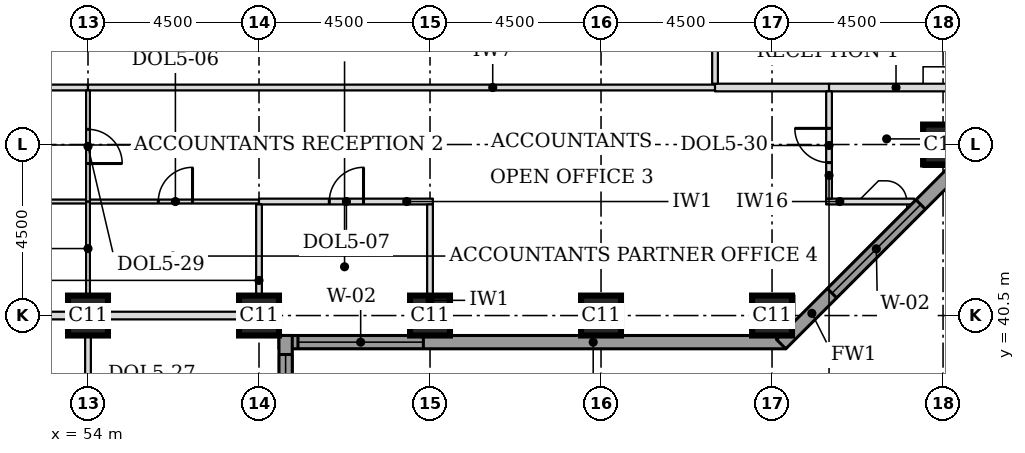
"""IFC4 building model, lengths in metres.
Left out: names, types, materials, properties, quantities, classifications, styles, units other than length and angle.
Written with IfcOpenShell. Run it as: python <this file> out.ifc"""

import sys

from ifc_helpers import new_model, si_unit, direction, frame, frame_2d, origin, origin_2d, place, context, subcontext, project, spatial, rectangle, extrude, element, fill, save


model = new_model("IFC4")
c1 = context("Model", 3, precision=1e-05, world=origin(), true_north=direction((0.0, 1.0)))
c2 = subcontext(c1, "Body", "Model", "MODEL_VIEW")
j1 = project(units=[si_unit("LENGTHUNIT", "METRE"), si_unit("PLANEANGLEUNIT", "RADIAN")], contexts=[c1])
p1 = place(None, origin())
s1 = spatial("IfcSite", under=j1, at=p1, CompositionType="ELEMENT")
p2 = place(p1, origin())
s2 = spatial("IfcBuilding", under=s1, at=p2, CompositionType="ELEMENT")
p3 = place(p2, frame((0.0, 0.0, 112.2)))
s3 = spatial("IfcBuildingStorey", under=s2, at=p3, CompositionType="ELEMENT", Elevation=112.2)
for number, where, z_axis, x_axis in (
    (1, (54.0, 40.5, 0.0), (0.0, 0.0, 1.0), (1.0, 0.0, 0.0)),
    (2, (58.5, 40.5, 0.0), (0.0, 0.0, 1.0), (1.0, 0.0, 0.0)),
    (3, (63.0, 40.5, 0.0), (0.0, 0.0, 1.0), (1.0, 0.0, 0.0)),
    (4, (67.5, 40.5, 0.0), (0.0, 0.0, 1.0), (1.0, 0.0, 0.0)),
    (5, (72.0, 40.5, 0.0), (0.0, 0.0, 1.0), (1.0, 0.0, 0.0)),
    (6, (76.5, 45.0, 0.0), (0.0, 0.0, 1.0), (1.0, 0.0, 0.0)),
):
    element("IfcColumn", number, at=place(p3, frame(where, z_axis=z_axis, x_axis=x_axis)), inside=s3, PredefinedType="COLUMN", context=c2, shape_type="SweptSolid", body=[
        extrude(rectangle(XDim=1.05, YDim=1.05, at=origin_2d()), origin(), (0.0, 0.0, 1.0), 3.7),
    ])
p4 = place(p3, frame((59.025, 39.8, 0.0), z_axis=(0.0, 0.0, 1.0), x_axis=(1.0, 0.0, 0.0)))
e7 = element("IfcWall", 7, at=p4, inside=s3, PredefinedType="STANDARD", context=c2, shape_type="SweptSolid", body=[
    extrude(rectangle(XDim=13.337, YDim=0.35, at=frame_2d((6.669, 0.0))), origin(), (0.0, 0.0, 1.0), 3.525),
])
p5 = place(p4, frame((0.5, 0.0, 0.9)))
e8 = element("IfcOpeningElement", 8, at=p5, cuts=e7, PredefinedType="OPENING", context=c2, shape_type="SweptSolid", body=[
    extrude(rectangle(XDim=3.3, YDim=1.9, at=frame_2d((1.65, 0.95))), frame((0.0, 0.185, 0.0), z_axis=(0.0, -1.0, 0.0), x_axis=(1.0, 0.0, 0.0)), (0.0, 0.0, 1.0), 0.37),
])
p6 = place(p3, frame((72.239, 39.749, 0.0), z_axis=(0.0, 0.0, 1.0), x_axis=(0.707106781187, 0.707106781187, 0.0)))
e9 = element("IfcWall", 9, at=p6, inside=s3, PredefinedType="STANDARD", context=c2, shape_type="SweptSolid", body=[
    extrude(rectangle(XDim=7.089, YDim=0.35, at=frame_2d((3.544, 0.0))), origin(), (0.0, 0.0, 1.0), 3.525),
])
p7 = place(p6, frame((1.894, 0.0, 0.9)))
e10 = element("IfcOpeningElement", 10, at=p7, cuts=e9, PredefinedType="OPENING", context=c2, shape_type="SweptSolid", body=[
    extrude(rectangle(XDim=3.3, YDim=1.9, at=frame_2d((1.65, 0.95))), frame((0.0, 0.185, 0.0), z_axis=(0.0, -1.0, 0.0), x_axis=(1.0, 0.0, 0.0)), (0.0, 0.0, 1.0), 0.37),
])
p8 = place(p3, frame((59.2, 22.138, 0.0), z_axis=(0.0, 0.0, 1.0), x_axis=(0.0, 1.0, 0.0)))
e11 = element("IfcWall", 11, at=p8, inside=s3, PredefinedType="STANDARD", context=c2, shape_type="SweptSolid", body=[
    extrude(rectangle(XDim=17.837, YDim=0.35, at=frame_2d((8.919, 0.0))), origin(), (0.0, 0.0, 1.0), 3.525),
])
p9 = place(p8, frame((5.462, 0.0, 0.9)))
e12 = element("IfcOpeningElement", 12, at=p9, cuts=e11, PredefinedType="OPENING", context=c2, shape_type="SweptSolid", body=[
    extrude(rectangle(XDim=3.3, YDim=1.9, at=frame_2d((1.65, 0.95))), frame((0.0, 0.185, 0.0), z_axis=(0.0, -1.0, 0.0), x_axis=(1.0, 0.0, 0.0)), (0.0, 0.0, 1.0), 0.37),
])
p10 = place(p8, frame((14.037, 0.0, 0.9)))
e13 = element("IfcOpeningElement", 13, at=p10, cuts=e11, PredefinedType="OPENING", context=c2, shape_type="SweptSolid", body=[
    extrude(rectangle(XDim=3.3, YDim=1.9, at=frame_2d((1.65, 0.95))), frame((0.0, 0.185, 0.0), z_axis=(0.0, -1.0, 0.0), x_axis=(1.0, 0.0, 0.0)), (0.0, 0.0, 1.0), 0.37),
])
p11 = place(p3, frame((50.015, 40.5, 0.0), z_axis=(0.0, 0.0, 1.0), x_axis=(1.0, 0.0, 0.0)))
e14 = element("IfcWall", 14, at=p11, inside=s3, PredefinedType="PARTITIONING", context=c2, shape_type="SweptSolid", body=[
    extrude(rectangle(XDim=3.46, YDim=0.2, at=frame_2d((1.73, 0.0))), origin(), (0.0, 0.0, 1.0), 2.8),
])
p12 = place(p3, frame((54.495, 40.5, 0.0), z_axis=(0.0, 0.0, 1.0), x_axis=(1.0, 0.0, 0.0)))
e15 = element("IfcWall", 15, at=p12, inside=s3, PredefinedType="PARTITIONING", context=c2, shape_type="SweptSolid", body=[
    extrude(rectangle(XDim=3.48, YDim=0.2, at=frame_2d((1.74, 0.0))), origin(), (0.0, 0.0, 1.0), 2.8),
])
p13 = place(p3, frame((49.575, 43.5, 0.0), z_axis=(0.0, 0.0, 1.0), x_axis=(1.0, 0.0, 0.0)))
e16 = element("IfcWall", 16, at=p13, inside=s3, PredefinedType="PARTITIONING", context=c2, shape_type="SweptSolid", body=[
    extrude(rectangle(XDim=4.375, YDim=0.1, at=frame_2d((2.188, 0.0))), origin(), (0.0, 0.0, 1.0), 3.55),
])
p14 = place(p13, frame((1.75, 0.0, 0.0)))
e17 = element("IfcOpeningElement", 17, at=p14, cuts=e16, PredefinedType="OPENING", context=c2, shape_type="SweptSolid", body=[
    extrude(rectangle(XDim=0.9, YDim=2.1, at=frame_2d((0.45, 1.05))), frame((0.0, 0.06, 0.0), z_axis=(0.0, -1.0, 0.0), x_axis=(1.0, 0.0, 0.0)), (0.0, 0.0, 1.0), 0.12),
])
p15 = place(p3, frame((54.05, 43.5, 0.0), z_axis=(0.0, 0.0, 1.0), x_axis=(1.0, 0.0, 0.0)))
e18 = element("IfcWall", 18, at=p15, inside=s3, PredefinedType="PARTITIONING", context=c2, shape_type="SweptSolid", body=[
    extrude(rectangle(XDim=4.45, YDim=0.1, at=frame_2d((2.225, 0.0))), origin(), (0.0, 0.0, 1.0), 3.55),
])
p16 = place(p15, frame((1.8, 0.0, 0.0)))
e19 = element("IfcOpeningElement", 19, at=p16, cuts=e18, PredefinedType="OPENING", context=c2, shape_type="SweptSolid", body=[
    extrude(rectangle(XDim=0.9, YDim=2.1, at=frame_2d((0.45, 1.05))), frame((0.0, 0.06, 0.0), z_axis=(0.0, -1.0, 0.0), x_axis=(1.0, 0.0, 0.0)), (0.0, 0.0, 1.0), 0.12),
])
p17 = place(p3, frame((58.5, 43.5, 0.0), z_axis=(0.0, 0.0, 1.0), x_axis=(1.0, 0.0, 0.0)))
e20 = element("IfcWall", 20, at=p17, inside=s3, PredefinedType="PARTITIONING", context=c2, shape_type="SweptSolid", body=[
    extrude(rectangle(XDim=4.575, YDim=0.15, at=frame_2d((2.288, 0.0))), origin(), (0.0, 0.0, 1.0), 3.55),
])
p18 = place(p17, frame((1.85, 0.0, 0.0)))
e21 = element("IfcOpeningElement", 21, at=p18, cuts=e20, PredefinedType="OPENING", context=c2, shape_type="SweptSolid", body=[
    extrude(rectangle(XDim=0.9, YDim=2.1, at=frame_2d((0.45, 1.05))), frame((0.0, 0.085, 0.0), z_axis=(0.0, -1.0, 0.0), x_axis=(1.0, 0.0, 0.0)), (0.0, 0.0, 1.0), 0.17),
])
p19 = place(p3, frame((73.425, 43.5, 0.0), z_axis=(0.0, 0.0, 1.0), x_axis=(1.0, 0.0, 0.0)))
e22 = element("IfcWall", 22, at=p19, inside=s3, PredefinedType="PARTITIONING", context=c2, shape_type="SweptSolid", body=[
    extrude(rectangle(XDim=2.317, YDim=0.15, at=frame_2d((1.159, 0.0))), origin(), (0.0, 0.0, 1.0), 3.55),
])
p20 = place(p3, frame((49.425, 46.5, 0.0), z_axis=(0.0, 0.0, 1.0), x_axis=(1.0, 0.0, 0.0)))
e23 = element("IfcWall", 23, at=p20, inside=s3, PredefinedType="PARTITIONING", context=c2, shape_type="SweptSolid", body=[
    extrude(rectangle(XDim=4.575, YDim=0.15, at=frame_2d((2.288, 0.0))), origin(), (0.0, 0.0, 1.0), 3.55),
])
p21 = place(p20, frame((1.8, 0.0, 0.0)))
e24 = element("IfcOpeningElement", 24, at=p21, cuts=e23, PredefinedType="OPENING", context=c2, shape_type="SweptSolid", body=[
    extrude(rectangle(XDim=1.0, YDim=2.1, at=frame_2d((0.5, 1.05))), frame((0.0, 0.085, 0.0), z_axis=(0.0, -1.0, 0.0), x_axis=(1.0, 0.0, 0.0)), (0.0, 0.0, 1.0), 0.17),
])
p22 = place(p3, frame((54.0, 46.5, 0.0), z_axis=(0.0, 0.0, 1.0), x_axis=(1.0, 0.0, 0.0)))
e25 = element("IfcWall", 25, at=p22, inside=s3, PredefinedType="PARTITIONING", context=c2, shape_type="SweptSolid", body=[
    extrude(rectangle(XDim=16.5, YDim=0.15, at=frame_2d((8.25, 0.0))), origin(), (0.0, 0.0, 1.0), 3.55),
])
p23 = place(p3, frame((70.5, 46.5, 0.0), z_axis=(0.0, 0.0, 1.0), x_axis=(1.0, 0.0, 0.0)))
e26 = element("IfcWall", 26, at=p23, inside=s3, PredefinedType="PARTITIONING", context=c2, shape_type="SweptSolid", body=[
    extrude(rectangle(XDim=3.0, YDim=0.2, at=frame_2d((1.5, 0.0))), origin(), (0.0, 0.0, 1.0), 3.55),
])
p24 = place(p3, frame((73.5, 46.5, 0.0), z_axis=(0.0, 0.0, 1.0), x_axis=(1.0, 0.0, 0.0)))
e27 = element("IfcWall", 27, at=p24, inside=s3, PredefinedType="PARTITIONING", context=c2, shape_type="SweptSolid", body=[
    extrude(rectangle(XDim=3.525, YDim=0.2, at=frame_2d((1.762, 0.0))), origin(), (0.0, 0.0, 1.0), 3.55),
])
p25 = place(p3, frame((54.0, 36.0, 0.0), z_axis=(0.0, 0.0, 1.0), x_axis=(0.0, 1.0, 0.0)))
e28 = element("IfcWall", 28, at=p25, inside=s3, PredefinedType="PARTITIONING", context=c2, shape_type="SweptSolid", body=[
    extrude(rectangle(XDim=3.975, YDim=0.15, at=frame_2d((1.988, 0.0))), origin(), (0.0, 0.0, 1.0), 3.55),
])
p26 = place(p25, frame((1.55, 0.0, 0.0)))
e29 = element("IfcOpeningElement", 29, at=p26, cuts=e28, PredefinedType="OPENING", context=c2, shape_type="SweptSolid", body=[
    extrude(rectangle(XDim=0.9, YDim=2.1, at=frame_2d((0.45, 1.05))), frame((0.0, 0.085, 0.0), z_axis=(0.0, -1.0, 0.0), x_axis=(1.0, 0.0, 0.0)), (0.0, 0.0, 1.0), 0.17),
])
p27 = place(p3, frame((63.0, 39.975, 0.0), z_axis=(0.0, 0.0, 1.0), x_axis=(0.0, 1.0, 0.0)))
e30 = element("IfcWall", 30, at=p27, inside=s3, PredefinedType="PARTITIONING", context=c2, shape_type="SweptSolid", body=[
    extrude(rectangle(XDim=3.45, YDim=0.15, at=frame_2d((1.725, 0.0))), origin(), (0.0, 0.0, 1.0), 3.55),
])
p28 = place(p3, frame((54.0, 41.025, 0.0), z_axis=(0.0, 0.0, 1.0), x_axis=(0.0, 1.0, 0.0)))
e31 = element("IfcWall", 31, at=p28, inside=s3, PredefinedType="PARTITIONING", context=c2, shape_type="SweptSolid", body=[
    extrude(rectangle(XDim=2.475, YDim=0.1, at=frame_2d((1.238, 0.0))), origin(), (0.0, 0.0, 1.0), 3.55),
])
p29 = place(p3, frame((58.5, 41.025, 0.0), z_axis=(0.0, 0.0, 1.0), x_axis=(0.0, 1.0, 0.0)))
e32 = element("IfcWall", 32, at=p29, inside=s3, PredefinedType="PARTITIONING", context=c2, shape_type="SweptSolid", body=[
    extrude(rectangle(XDim=2.4, YDim=0.15, at=frame_2d((1.2, 0.0))), origin(), (0.0, 0.0, 1.0), 3.55),
])
p30 = place(p3, frame((54.0, 43.5, 0.0), z_axis=(0.0, 0.0, 1.0), x_axis=(0.0, 1.0, 0.0)))
e33 = element("IfcWall", 33, at=p30, inside=s3, PredefinedType="PARTITIONING", context=c2, shape_type="SweptSolid", body=[
    extrude(rectangle(XDim=2.925, YDim=0.1, at=frame_2d((1.462, 0.0))), origin(), (0.0, 0.0, 1.0), 3.55),
])
p31 = place(p30, frame((1.0, 0.0, 0.0)))
e34 = element("IfcOpeningElement", 34, at=p31, cuts=e33, PredefinedType="OPENING", context=c2, shape_type="SweptSolid", body=[
    extrude(rectangle(XDim=0.9, YDim=2.1, at=frame_2d((0.45, 1.05))), frame((0.0, 0.06, 0.0), z_axis=(0.0, -1.0, 0.0), x_axis=(1.0, 0.0, 0.0)), (0.0, 0.0, 1.0), 0.12),
])
p32 = place(p3, frame((73.5, 43.575, 0.0), z_axis=(0.0, 0.0, 1.0), x_axis=(0.0, 1.0, 0.0)))
e35 = element("IfcWall", 35, at=p32, inside=s3, PredefinedType="PARTITIONING", context=c2, shape_type="SweptSolid", body=[
    extrude(rectangle(XDim=2.825, YDim=0.15, at=frame_2d((1.413, 0.0))), origin(), (0.0, 0.0, 1.0), 3.55),
])
p33 = place(p32, frame((0.95, 0.0, 0.0)))
e36 = element("IfcOpeningElement", 36, at=p33, cuts=e35, PredefinedType="OPENING", context=c2, shape_type="SweptSolid", body=[
    extrude(rectangle(XDim=0.9, YDim=2.1, at=frame_2d((0.45, 1.05))), frame((0.0, 0.085, 0.0), z_axis=(0.0, -1.0, 0.0), x_axis=(1.0, 0.0, 0.0)), (0.0, 0.0, 1.0), 0.17),
])
p34 = place(p3, frame((70.5, 46.6, 0.0), z_axis=(0.0, 0.0, 1.0), x_axis=(0.0, 1.0, 0.0)))
e37 = element("IfcWall", 37, at=p34, inside=s3, PredefinedType="PARTITIONING", context=c2, shape_type="SweptSolid", body=[
    extrude(rectangle(XDim=4.4, YDim=0.15, at=frame_2d((2.2, 0.0))), origin(), (0.0, 0.0, 1.0), 3.55),
])
p35 = place(p34, frame((1.7, 0.0, 0.0)))
e38 = element("IfcOpeningElement", 38, at=p35, cuts=e37, PredefinedType="OPENING", context=c2, shape_type="SweptSolid", body=[
    extrude(rectangle(XDim=1.0, YDim=2.1, at=frame_2d((0.5, 1.05))), frame((0.0, 0.085, 0.0), z_axis=(0.0, -1.0, 0.0), x_axis=(1.0, 0.0, 0.0)), (0.0, 0.0, 1.0), 0.17),
])
p36 = place(p5, origin())
e39 = element("IfcWindow", 39, at=p36, inside=s3, PartitioningType="SINGLE_PANEL", PredefinedType="WINDOW", context=c2, shape_type="SweptSolid", body=[
    extrude(rectangle(XDim=3.3, YDim=1.9, at=frame_2d((1.65, 0.95))), frame((0.0, 0.085, 0.0), z_axis=(0.0, -1.0, 0.0), x_axis=(1.0, 0.0, 0.0)), (0.0, 0.0, 1.0), 0.06),
])
fill(e8, e39)
p37 = place(p7, origin())
e40 = element("IfcWindow", 40, at=p37, inside=s3, PartitioningType="SINGLE_PANEL", PredefinedType="WINDOW", context=c2, shape_type="SweptSolid", body=[
    extrude(rectangle(XDim=3.3, YDim=1.9, at=frame_2d((1.65, 0.95))), frame((0.0, 0.085, 0.0), z_axis=(0.0, -1.0, 0.0), x_axis=(1.0, 0.0, 0.0)), (0.0, 0.0, 1.0), 0.06),
])
fill(e10, e40)
p38 = place(p10, origin())
e41 = element("IfcWindow", 41, at=p38, inside=s3, PartitioningType="SINGLE_PANEL", PredefinedType="WINDOW", context=c2, shape_type="SweptSolid", body=[
    extrude(rectangle(XDim=3.3, YDim=1.9, at=frame_2d((1.65, 0.95))), frame((0.0, 0.085, 0.0), z_axis=(0.0, -1.0, 0.0), x_axis=(1.0, 0.0, 0.0)), (0.0, 0.0, 1.0), 0.06),
])
fill(e13, e41)
p39 = place(p31, frame((0.9, 0.0, 0.0), z_axis=(0.0, 0.0, 1.0), x_axis=(-1.0, 0.0, 0.0)))
e42 = element("IfcDoor", 42, at=p39, inside=s3, OperationType="SINGLE_SWING_RIGHT", PredefinedType="DOOR", context=c2, shape_type="SweptSolid", body=[
    extrude(rectangle(XDim=0.9, YDim=2.1, at=frame_2d((0.45, 1.05))), frame((0.0, 0.025, 0.0), z_axis=(0.0, -1.0, 0.0), x_axis=(1.0, 0.0, 0.0)), (0.0, 0.0, 1.0), 0.05),
])
fill(e34, e42)
p40 = place(p16, origin())
e43 = element("IfcDoor", 43, at=p40, inside=s3, OperationType="SINGLE_SWING_RIGHT", PredefinedType="DOOR", context=c2, shape_type="SweptSolid", body=[
    extrude(rectangle(XDim=0.9, YDim=2.1, at=frame_2d((0.45, 1.05))), frame((0.0, 0.025, 0.0), z_axis=(0.0, -1.0, 0.0), x_axis=(1.0, 0.0, 0.0)), (0.0, 0.0, 1.0), 0.05),
])
fill(e19, e43)
p41 = place(p33, origin())
e44 = element("IfcDoor", 44, at=p41, inside=s3, OperationType="SINGLE_SWING_RIGHT", PredefinedType="DOOR", context=c2, shape_type="SweptSolid", body=[
    extrude(rectangle(XDim=0.9, YDim=2.1, at=frame_2d((0.45, 1.05))), frame((0.0, 0.025, 0.0), z_axis=(0.0, -1.0, 0.0), x_axis=(1.0, 0.0, 0.0)), (0.0, 0.0, 1.0), 0.05),
])
fill(e36, e44)
p42 = place(p18, origin())
e45 = element("IfcDoor", 45, at=p42, inside=s3, OperationType="SINGLE_SWING_RIGHT", PredefinedType="DOOR", context=c2, shape_type="SweptSolid", body=[
    extrude(rectangle(XDim=0.9, YDim=2.1, at=frame_2d((0.45, 1.05))), frame((0.0, 0.025, 0.0), z_axis=(0.0, -1.0, 0.0), x_axis=(1.0, 0.0, 0.0)), (0.0, 0.0, 1.0), 0.05),
])
fill(e21, e45)
save(model, sys.argv[1])
